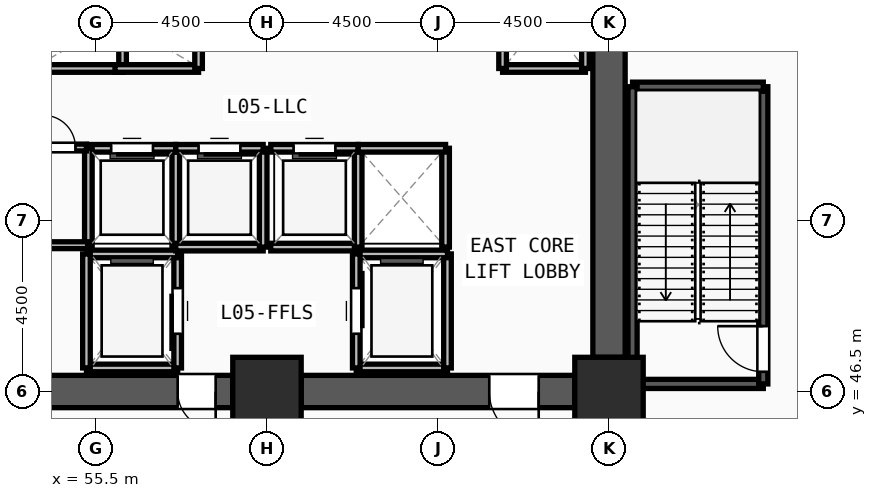
"""IFC4 building model, lengths in metres.
Left out: names, types, materials, properties, quantities, classifications, styles, units other than length and angle.
Written with IfcOpenShell. Run it as: python <this file> out.ifc"""

import sys

from ifc_helpers import new_model, si_unit, direction, frame, frame_2d, origin, origin_2d, place, context, subcontext, project, spatial, rectangle, extrude, source, transform, mapped, element, fill, save


model = new_model("IFC4")
c1 = context("Model", 3, precision=1e-05, world=origin(), true_north=direction((0.0, 1.0)))
c2 = subcontext(c1, "Body", "Model", "MODEL_VIEW")
j1 = project(units=[si_unit("LENGTHUNIT", "METRE"), si_unit("PLANEANGLEUNIT", "RADIAN")], contexts=[c1])
p1 = place(None, origin())
s1 = spatial("IfcSite", under=j1, at=p1, CompositionType="ELEMENT")
p2 = place(p1, origin())
s2 = spatial("IfcBuilding", under=s1, at=p2, CompositionType="ELEMENT")
p3 = place(p2, frame((0.0, 0.0, 18.9)))
s3 = spatial("IfcBuildingStorey", under=s2, at=p3, CompositionType="ELEMENT", Elevation=18.9)
m1 = source(origin(), c2, "Body", "SweptSolid", [
    extrude(rectangle(XDim=1.8, YDim=1.8, at=origin_2d()), origin(), (0.0, 0.0, 1.0), 4.5),
])
for number, where, z_axis, x_axis in (
    (1, (60.0, 46.5, 0.0), (0.0, 0.0, 1.0), (1.0, 0.0, 0.0)),
    (2, (69.0, 46.5, 0.0), (0.0, 0.0, 1.0), (1.0, 0.0, 0.0)),
):
    element("IfcColumn", number, at=place(p3, frame(where, z_axis=z_axis, x_axis=x_axis)), inside=s3, PredefinedType="COLUMN", context=c2, shape_type="MappedRepresentation", body=[
        mapped(m1, transform((0.0, 0.0, 0.0), x_axis=(1.0, 0.0, 0.0), y_axis=(0.0, 1.0, 0.0), z_axis=(0.0, 0.0, 1.0), scale=1.0)),
    ])
p4 = place(p3, frame((69.0, 60.6, 0.0), z_axis=(0.0, 0.0, 1.0), x_axis=(0.0, -1.0, 0.0)))
e3 = element("IfcWall", 3, at=p4, inside=s3, PredefinedType="SHEAR", context=c2, shape_type="SweptSolid", body=[
    extrude(rectangle(XDim=13.2, YDim=0.85, at=frame_2d((6.6, 0.0))), origin(), (0.0, 0.0, 1.0), 3.6),
])
m2 = source(origin(), c2, "Body", "SweptSolid", [
    extrude(rectangle(XDim=1.2, YDim=2.2, at=frame_2d((0.6, 1.1))), frame((0.0, 0.435, 0.0), z_axis=(0.0, -1.0, 0.0), x_axis=(1.0, 0.0, 0.0)), (0.0, 0.0, 1.0), 0.87),
])
p5 = place(p4, frame((1.05, 0.0, 0.0)))
e4 = element("IfcOpeningElement", 4, at=p5, cuts=e3, PredefinedType="OPENING", context=c2, shape_type="MappedRepresentation", body=[
    mapped(m2, transform((0.0, 0.0, 0.0), x_axis=(1.0, 0.0, 0.0), y_axis=(0.0, 1.0, 0.0), z_axis=(0.0, 0.0, 1.0), scale=1.0)),
])
p6 = place(p3, frame((68.1, 46.5, 0.0), z_axis=(0.0, 0.0, 1.0), x_axis=(-1.0, 0.0, 0.0)))
e5 = element("IfcWall", 5, at=p6, inside=s3, PredefinedType="SHEAR", context=c2, shape_type="SweptSolid", body=[
    extrude(rectangle(XDim=7.2, YDim=0.85, at=frame_2d((3.6, 0.0))), origin(), (0.0, 0.0, 1.0), 3.6),
])
m3 = source(origin(), c2, "Body", "SweptSolid", [
    extrude(rectangle(XDim=1.3, YDim=2.2, at=frame_2d((0.65, 1.1))), frame((0.0, 0.435, 0.0), z_axis=(0.0, -1.0, 0.0), x_axis=(1.0, 0.0, 0.0)), (0.0, 0.0, 1.0), 0.87),
])
p7 = place(p6, frame((0.95, 0.0, 0.0)))
e6 = element("IfcOpeningElement", 6, at=p7, cuts=e5, PredefinedType="OPENING", context=c2, shape_type="MappedRepresentation", body=[
    mapped(m3, transform((0.0, 0.0, 0.0), x_axis=(1.0, 0.0, 0.0), y_axis=(0.0, 1.0, 0.0), z_axis=(0.0, 0.0, 1.0), scale=1.0)),
])
p8 = place(p3, frame((59.1, 46.5, 0.0), z_axis=(0.0, 0.0, 1.0), x_axis=(-1.0, 0.0, 0.0)))
e7 = element("IfcWall", 7, at=p8, inside=s3, PredefinedType="SHEAR", context=c2, shape_type="SweptSolid", body=[
    extrude(rectangle(XDim=7.2, YDim=0.85, at=frame_2d((3.6, 0.0))), origin(), (0.0, 0.0, 1.0), 3.6),
])
p9 = place(p8, frame((4.95, 0.0, 0.0)))
e8 = element("IfcOpeningElement", 8, at=p9, cuts=e7, PredefinedType="OPENING", context=c2, shape_type="MappedRepresentation", body=[
    mapped(m3, transform((0.0, 0.0, 0.0), x_axis=(1.0, 0.0, 0.0), y_axis=(0.0, 1.0, 0.0), z_axis=(0.0, 0.0, 1.0), scale=1.0)),
])
m4 = source(origin(), c2, "Body", "SweptSolid", [
    extrude(rectangle(XDim=1.0, YDim=2.2, at=frame_2d((0.5, 1.1))), frame((0.0, 0.435, 0.0), z_axis=(0.0, -1.0, 0.0), x_axis=(1.0, 0.0, 0.0)), (0.0, 0.0, 1.0), 0.87),
])
p10 = place(p8, frame((0.45, 0.0, 0.0)))
e9 = element("IfcOpeningElement", 9, at=p10, cuts=e7, PredefinedType="OPENING", context=c2, shape_type="MappedRepresentation", body=[
    mapped(m4, transform((0.0, 0.0, 0.0), x_axis=(1.0, 0.0, 0.0), y_axis=(0.0, 1.0, 0.0), z_axis=(0.0, 0.0, 1.0), scale=1.0)),
])
p11 = place(p3, frame((69.62, 46.7, 0.0), z_axis=(0.0, 0.0, 1.0), x_axis=(1.0, 0.0, 0.0)))
e10 = element("IfcWall", 10, at=p11, inside=s3, PredefinedType="SOLIDWALL", context=c2, shape_type="SweptSolid", body=[
    extrude(rectangle(XDim=3.44, YDim=0.24, at=frame_2d((1.72, 0.0))), origin(), (0.0, 0.0, 1.0), 3.6),
])
p12 = place(p3, frame((73.06, 46.7, 0.0), z_axis=(0.0, 0.0, 1.0), x_axis=(0.0, 1.0, 0.0)))
e11 = element("IfcWall", 11, at=p12, inside=s3, PredefinedType="SOLIDWALL", context=c2, shape_type="SweptSolid", body=[
    extrude(rectangle(XDim=7.82, YDim=0.24, at=frame_2d((3.91, 0.0))), origin(), (0.0, 0.0, 1.0), 3.6),
])
m5 = source(origin(), c2, "Body", "SweptSolid", [
    extrude(rectangle(XDim=1.2, YDim=2.2, at=frame_2d((0.6, 1.1))), frame((0.0, 0.13, 0.0), z_axis=(0.0, -1.0, 0.0), x_axis=(1.0, 0.0, 0.0)), (0.0, 0.0, 1.0), 0.26),
])
p13 = place(p12, frame((0.32, 0.0, 0.0)))
e12 = element("IfcOpeningElement", 12, at=p13, cuts=e11, PredefinedType="OPENING", context=c2, shape_type="MappedRepresentation", body=[
    mapped(m5, transform((0.0, 0.0, 0.0), x_axis=(1.0, 0.0, 0.0), y_axis=(0.0, 1.0, 0.0), z_axis=(0.0, 0.0, 1.0), scale=1.0)),
])
p14 = place(p3, frame((73.06, 54.52, 0.0), z_axis=(0.0, 0.0, 1.0), x_axis=(-1.0, 0.0, 0.0)))
e13 = element("IfcWall", 13, at=p14, inside=s3, PredefinedType="SOLIDWALL", context=c2, shape_type="SweptSolid", body=[
    extrude(rectangle(XDim=3.44, YDim=0.24, at=frame_2d((1.72, 0.0))), origin(), (0.0, 0.0, 1.0), 3.6),
])
p15 = place(p3, frame((69.62, 54.52, 0.0), z_axis=(0.0, 0.0, 1.0), x_axis=(0.0, -1.0, 0.0)))
e14 = element("IfcWall", 14, at=p15, inside=s3, PredefinedType="SOLIDWALL", context=c2, shape_type="SweptSolid", body=[
    extrude(rectangle(XDim=7.82, YDim=0.24, at=frame_2d((3.91, 0.0))), origin(), (0.0, 0.0, 1.0), 3.6),
])
p16 = place(p3, frame((55.25, 47.12, 0.0), z_axis=(0.0, 0.0, 1.0), x_axis=(1.0, 0.0, 0.0)))
e15 = element("IfcWall", 15, at=p16, inside=s3, PredefinedType="SOLIDWALL", context=c2, shape_type="SweptSolid", body=[
    extrude(rectangle(XDim=2.4, YDim=0.2, at=frame_2d((1.2, 0.0))), origin(), (0.0, 0.0, 1.0), 3.6),
])
p17 = place(p3, frame((57.65, 47.12, 0.0), z_axis=(0.0, 0.0, 1.0), x_axis=(0.0, 1.0, 0.0)))
e16 = element("IfcWall", 16, at=p17, inside=s3, PredefinedType="SOLIDWALL", context=c2, shape_type="SweptSolid", body=[
    extrude(rectangle(XDim=3.0, YDim=0.2, at=frame_2d((1.5, 0.0))), origin(), (0.0, 0.0, 1.0), 3.6),
])
m6 = source(origin(), c2, "Body", "SweptSolid", [
    extrude(rectangle(XDim=1.2, YDim=2.3, at=frame_2d((0.6, 1.15))), frame((0.0, 0.11, 0.0), z_axis=(0.0, -1.0, 0.0), x_axis=(1.0, 0.0, 0.0)), (0.0, 0.0, 1.0), 0.22),
])
p18 = place(p17, frame((0.9, 0.0, 0.0)))
e17 = element("IfcOpeningElement", 17, at=p18, cuts=e16, PredefinedType="OPENING", context=c2, shape_type="MappedRepresentation", body=[
    mapped(m6, transform((0.0, 0.0, 0.0), x_axis=(1.0, 0.0, 0.0), y_axis=(0.0, 1.0, 0.0), z_axis=(0.0, 0.0, 1.0), scale=1.0)),
])
p19 = place(p3, frame((57.65, 50.12, 0.0), z_axis=(0.0, 0.0, 1.0), x_axis=(-1.0, 0.0, 0.0)))
e18 = element("IfcWall", 18, at=p19, inside=s3, PredefinedType="SOLIDWALL", context=c2, shape_type="SweptSolid", body=[
    extrude(rectangle(XDim=2.4, YDim=0.2, at=frame_2d((1.2, 0.0))), origin(), (0.0, 0.0, 1.0), 3.6),
])
p20 = place(p3, frame((55.25, 50.12, 0.0), z_axis=(0.0, 0.0, 1.0), x_axis=(0.0, -1.0, 0.0)))
e19 = element("IfcWall", 19, at=p20, inside=s3, PredefinedType="SOLIDWALL", context=c2, shape_type="SweptSolid", body=[
    extrude(rectangle(XDim=3.0, YDim=0.2, at=frame_2d((1.5, 0.0))), origin(), (0.0, 0.0, 1.0), 3.6),
])
p21 = place(p3, frame((62.35, 47.12, 0.0), z_axis=(0.0, 0.0, 1.0), x_axis=(1.0, 0.0, 0.0)))
e20 = element("IfcWall", 20, at=p21, inside=s3, PredefinedType="SOLIDWALL", context=c2, shape_type="SweptSolid", body=[
    extrude(rectangle(XDim=2.4, YDim=0.2, at=frame_2d((1.2, 0.0))), origin(), (0.0, 0.0, 1.0), 3.6),
])
p22 = place(p3, frame((64.75, 47.12, 0.0), z_axis=(0.0, 0.0, 1.0), x_axis=(0.0, 1.0, 0.0)))
e21 = element("IfcWall", 21, at=p22, inside=s3, PredefinedType="SOLIDWALL", context=c2, shape_type="SweptSolid", body=[
    extrude(rectangle(XDim=3.0, YDim=0.2, at=frame_2d((1.5, 0.0))), origin(), (0.0, 0.0, 1.0), 3.6),
])
p23 = place(p3, frame((64.75, 50.12, 0.0), z_axis=(0.0, 0.0, 1.0), x_axis=(-1.0, 0.0, 0.0)))
e22 = element("IfcWall", 22, at=p23, inside=s3, PredefinedType="SOLIDWALL", context=c2, shape_type="SweptSolid", body=[
    extrude(rectangle(XDim=2.4, YDim=0.2, at=frame_2d((1.2, 0.0))), origin(), (0.0, 0.0, 1.0), 3.6),
])
p24 = place(p3, frame((62.35, 50.12, 0.0), z_axis=(0.0, 0.0, 1.0), x_axis=(0.0, -1.0, 0.0)))
e23 = element("IfcWall", 23, at=p24, inside=s3, PredefinedType="SOLIDWALL", context=c2, shape_type="SweptSolid", body=[
    extrude(rectangle(XDim=3.0, YDim=0.2, at=frame_2d((1.5, 0.0))), origin(), (0.0, 0.0, 1.0), 3.6),
])
p25 = place(p24, frame((0.9, 0.0, 0.0)))
e24 = element("IfcOpeningElement", 24, at=p25, cuts=e23, PredefinedType="OPENING", context=c2, shape_type="MappedRepresentation", body=[
    mapped(m6, transform((0.0, 0.0, 0.0), x_axis=(1.0, 0.0, 0.0), y_axis=(0.0, 1.0, 0.0), z_axis=(0.0, 0.0, 1.0), scale=1.0)),
])
p26 = place(p3, frame((66.2, 55.0, 0.0), z_axis=(0.0, 0.0, 1.0), x_axis=(1.0, 0.0, 0.0)))
e25 = element("IfcWall", 25, at=p26, inside=s3, PredefinedType="SOLIDWALL", context=c2, shape_type="SweptSolid", body=[
    extrude(rectangle(XDim=2.18, YDim=0.2, at=frame_2d((1.09, 0.0))), origin(), (0.0, 0.0, 1.0), 3.6),
])
for number, where, z_axis, x_axis in (
    (26, (68.38, 55.0, 0.0), (0.0, 0.0, 1.0), (0.0, 1.0, 0.0)),
    (27, (66.2, 57.75, 0.0), (0.0, 0.0, 1.0), (0.0, -1.0, 0.0)),
):
    element("IfcWall", number, at=place(p3, frame(where, z_axis=z_axis, x_axis=x_axis)), inside=s3, PredefinedType="SOLIDWALL", context=c2, shape_type="SweptSolid", body=[
        extrude(rectangle(XDim=2.75, YDim=0.2, at=frame_2d((1.375, 0.0))), origin(), (0.0, 0.0, 1.0), 3.6),
    ])
p27 = place(p3, frame((57.6, 50.3, 0.0), z_axis=(0.0, 0.0, 1.0), x_axis=(0.0, 1.0, 0.0)))
e28 = element("IfcWall", 28, at=p27, inside=s3, PredefinedType="SOLIDWALL", context=c2, shape_type="SweptSolid", body=[
    extrude(rectangle(XDim=2.6, YDim=0.2, at=frame_2d((1.3, 0.0))), origin(), (0.0, 0.0, 1.0), 3.6),
])
p28 = place(p3, frame((57.6, 52.9, 0.0), z_axis=(0.0, 0.0, 1.0), x_axis=(-1.0, 0.0, 0.0)))
e29 = element("IfcWall", 29, at=p28, inside=s3, PredefinedType="SOLIDWALL", context=c2, shape_type="SweptSolid", body=[
    extrude(rectangle(XDim=2.3, YDim=0.2, at=frame_2d((1.15, 0.0))), origin(), (0.0, 0.0, 1.0), 3.6),
])
m7 = source(origin(), c2, "Body", "SweptSolid", [
    extrude(rectangle(XDim=1.1, YDim=2.2, at=frame_2d((0.55, 1.1))), frame((0.0, 0.11, 0.0), z_axis=(0.0, -1.0, 0.0), x_axis=(1.0, 0.0, 0.0)), (0.0, 0.0, 1.0), 0.22),
])
p29 = place(p28, frame((0.6, 0.0, 0.0)))
e30 = element("IfcOpeningElement", 30, at=p29, cuts=e29, PredefinedType="OPENING", context=c2, shape_type="MappedRepresentation", body=[
    mapped(m7, transform((0.0, 0.0, 0.0), x_axis=(1.0, 0.0, 0.0), y_axis=(0.0, 1.0, 0.0), z_axis=(0.0, 0.0, 1.0), scale=1.0)),
])
p30 = place(p3, frame((55.3, 52.9, 0.0), z_axis=(0.0, 0.0, 1.0), x_axis=(0.0, -1.0, 0.0)))
e31 = element("IfcWall", 31, at=p30, inside=s3, PredefinedType="SOLIDWALL", context=c2, shape_type="SweptSolid", body=[
    extrude(rectangle(XDim=2.6, YDim=0.2, at=frame_2d((1.3, 0.0))), origin(), (0.0, 0.0, 1.0), 3.6),
])
p31 = place(p3, frame((57.6, 50.3, 0.0), z_axis=(0.0, 0.0, 1.0), x_axis=(1.0, 0.0, 0.0)))
e32 = element("IfcWall", 32, at=p31, inside=s3, PredefinedType="SOLIDWALL", context=c2, shape_type="SweptSolid", body=[
    extrude(rectangle(XDim=2.3, YDim=0.2, at=frame_2d((1.15, 0.0))), origin(), (0.0, 0.0, 1.0), 3.6),
])
p32 = place(p3, frame((59.9, 50.3, 0.0), z_axis=(0.0, 0.0, 1.0), x_axis=(0.0, 1.0, 0.0)))
e33 = element("IfcWall", 33, at=p32, inside=s3, PredefinedType="SOLIDWALL", context=c2, shape_type="SweptSolid", body=[
    extrude(rectangle(XDim=2.6, YDim=0.2, at=frame_2d((1.3, 0.0))), origin(), (0.0, 0.0, 1.0), 3.6),
])
p33 = place(p3, frame((59.9, 52.9, 0.0), z_axis=(0.0, 0.0, 1.0), x_axis=(-1.0, 0.0, 0.0)))
e34 = element("IfcWall", 34, at=p33, inside=s3, PredefinedType="SOLIDWALL", context=c2, shape_type="SweptSolid", body=[
    extrude(rectangle(XDim=2.3, YDim=0.2, at=frame_2d((1.15, 0.0))), origin(), (0.0, 0.0, 1.0), 3.6),
])
p34 = place(p33, frame((0.6, 0.0, 0.0)))
e35 = element("IfcOpeningElement", 35, at=p34, cuts=e34, PredefinedType="OPENING", context=c2, shape_type="MappedRepresentation", body=[
    mapped(m7, transform((0.0, 0.0, 0.0), x_axis=(1.0, 0.0, 0.0), y_axis=(0.0, 1.0, 0.0), z_axis=(0.0, 0.0, 1.0), scale=1.0)),
])
p35 = place(p3, frame((60.1, 50.3, 0.0), z_axis=(0.0, 0.0, 1.0), x_axis=(1.0, 0.0, 0.0)))
e36 = element("IfcWall", 36, at=p35, inside=s3, PredefinedType="SOLIDWALL", context=c2, shape_type="SweptSolid", body=[
    extrude(rectangle(XDim=2.3, YDim=0.2, at=frame_2d((1.15, 0.0))), origin(), (0.0, 0.0, 1.0), 3.6),
])
p36 = place(p3, frame((62.4, 50.3, 0.0), z_axis=(0.0, 0.0, 1.0), x_axis=(0.0, 1.0, 0.0)))
e37 = element("IfcWall", 37, at=p36, inside=s3, PredefinedType="SOLIDWALL", context=c2, shape_type="SweptSolid", body=[
    extrude(rectangle(XDim=2.6, YDim=0.2, at=frame_2d((1.3, 0.0))), origin(), (0.0, 0.0, 1.0), 3.6),
])
p37 = place(p3, frame((62.4, 52.9, 0.0), z_axis=(0.0, 0.0, 1.0), x_axis=(-1.0, 0.0, 0.0)))
e38 = element("IfcWall", 38, at=p37, inside=s3, PredefinedType="SOLIDWALL", context=c2, shape_type="SweptSolid", body=[
    extrude(rectangle(XDim=2.3, YDim=0.2, at=frame_2d((1.15, 0.0))), origin(), (0.0, 0.0, 1.0), 3.6),
])
p38 = place(p37, frame((0.6, 0.0, 0.0)))
e39 = element("IfcOpeningElement", 39, at=p38, cuts=e38, PredefinedType="OPENING", context=c2, shape_type="MappedRepresentation", body=[
    mapped(m7, transform((0.0, 0.0, 0.0), x_axis=(1.0, 0.0, 0.0), y_axis=(0.0, 1.0, 0.0), z_axis=(0.0, 0.0, 1.0), scale=1.0)),
])
p39 = place(p3, frame((64.7, 50.3, 0.0), z_axis=(0.0, 0.0, 1.0), x_axis=(0.0, 1.0, 0.0)))
e40 = element("IfcWall", 40, at=p39, inside=s3, PredefinedType="SOLIDWALL", context=c2, shape_type="SweptSolid", body=[
    extrude(rectangle(XDim=2.6, YDim=0.2, at=frame_2d((1.3, 0.0))), origin(), (0.0, 0.0, 1.0), 3.6),
])
for number, where, z_axis, x_axis in (
    (41, (64.7, 52.9, 0.0), (0.0, 0.0, 1.0), (-1.0, 0.0, 0.0)),
    (42, (53.9, 55.0, 0.0), (0.0, 0.0, 1.0), (1.0, 0.0, 0.0)),
):
    element("IfcWall", number, at=place(p3, frame(where, z_axis=z_axis, x_axis=x_axis)), inside=s3, PredefinedType="SOLIDWALL", context=c2, shape_type="SweptSolid", body=[
        extrude(rectangle(XDim=2.3, YDim=0.2, at=frame_2d((1.15, 0.0))), origin(), (0.0, 0.0, 1.0), 3.6),
    ])
p40 = place(p3, frame((56.2, 55.0, 0.0), z_axis=(0.0, 0.0, 1.0), x_axis=(0.0, 1.0, 0.0)))
e43 = element("IfcWall", 43, at=p40, inside=s3, PredefinedType="SOLIDWALL", context=c2, shape_type="SweptSolid", body=[
    extrude(rectangle(XDim=2.6, YDim=0.2, at=frame_2d((1.3, 0.0))), origin(), (0.0, 0.0, 1.0), 3.6),
])
p41 = place(p3, frame((56.0, 55.0, 0.0), z_axis=(0.0, 0.0, 1.0), x_axis=(1.0, 0.0, 0.0)))
e44 = element("IfcWall", 44, at=p41, inside=s3, PredefinedType="SOLIDWALL", context=c2, shape_type="SweptSolid", body=[
    extrude(rectangle(XDim=2.2, YDim=0.2, at=frame_2d((1.1, 0.0))), origin(), (0.0, 0.0, 1.0), 3.6),
])
p42 = place(p3, frame((58.2, 55.0, 0.0), z_axis=(0.0, 0.0, 1.0), x_axis=(0.0, 1.0, 0.0)))
e45 = element("IfcWall", 45, at=p42, inside=s3, PredefinedType="SOLIDWALL", context=c2, shape_type="SweptSolid", body=[
    extrude(rectangle(XDim=2.6, YDim=0.2, at=frame_2d((1.3, 0.0))), origin(), (0.0, 0.0, 1.0), 3.6),
])
p43 = place(p3, frame((53.82, 52.92, 0.0), z_axis=(0.0, 0.0, 1.0), x_axis=(1.0, 0.0, 0.0)))
e46 = element("IfcWall", 46, at=p43, inside=s3, PredefinedType="PARTITIONING", context=c2, shape_type="SweptSolid", body=[
    extrude(rectangle(XDim=1.43, YDim=0.18, at=frame_2d((0.715, 0.0))), origin(), (0.0, 0.0, 1.0), 3.6),
])
m8 = source(origin(), c2, "Body", "SweptSolid", [
    extrude(rectangle(XDim=0.85, YDim=2.1, at=frame_2d((0.425, 1.05))), frame((0.0, 0.1, 0.0), z_axis=(0.0, -1.0, 0.0), x_axis=(1.0, 0.0, 0.0)), (0.0, 0.0, 1.0), 0.2),
])
p44 = place(p43, frame((0.29, 0.0, 0.0)))
e47 = element("IfcOpeningElement", 47, at=p44, cuts=e46, PredefinedType="OPENING", context=c2, shape_type="MappedRepresentation", body=[
    mapped(m8, transform((0.0, 0.0, 0.0), x_axis=(1.0, 0.0, 0.0), y_axis=(0.0, 1.0, 0.0), z_axis=(0.0, 0.0, 1.0), scale=1.0)),
])
p45 = place(p3, frame((53.79, 50.35, 0.0), z_axis=(0.0, 0.0, 1.0), x_axis=(1.0, 0.0, 0.0)))
e48 = element("IfcWall", 48, at=p45, inside=s3, PredefinedType="PARTITIONING", context=c2, shape_type="SweptSolid", body=[
    extrude(rectangle(XDim=1.49, YDim=0.18, at=frame_2d((0.745, 0.0))), origin(), (0.0, 0.0, 1.0), 3.6),
])
m9 = source(origin(), c2, "Body", "SweptSolid", [
    extrude(rectangle(XDim=1.0, YDim=2.2, at=frame_2d((0.5, 1.1))), frame((0.0, 0.025, 0.0), z_axis=(0.0, -1.0, 0.0), x_axis=(1.0, 0.0, 0.0)), (0.0, 0.0, 1.0), 0.05),
])
p46 = place(p10, origin())
e49 = element("IfcDoor", 49, at=p46, inside=s3, OperationType="SINGLE_SWING_LEFT", PredefinedType="DOOR", context=c2, shape_type="MappedRepresentation", body=[
    mapped(m9, transform((0.0, 0.0, 0.0), x_axis=(1.0, 0.0, 0.0), y_axis=(0.0, 1.0, 0.0), z_axis=(0.0, 0.0, 1.0), scale=1.0)),
])
fill(e9, e49)
m10 = source(origin(), c2, "Body", "SweptSolid", [
    extrude(rectangle(XDim=1.3, YDim=2.2, at=frame_2d((0.65, 1.1))), frame((0.0, 0.025, 0.0), z_axis=(0.0, -1.0, 0.0), x_axis=(1.0, 0.0, 0.0)), (0.0, 0.0, 1.0), 0.05),
])
p47 = place(p7, origin())
e50 = element("IfcDoor", 50, at=p47, inside=s3, OperationType="SINGLE_SWING_LEFT", PredefinedType="DOOR", context=c2, shape_type="MappedRepresentation", body=[
    mapped(m10, transform((0.0, 0.0, 0.0), x_axis=(1.0, 0.0, 0.0), y_axis=(0.0, 1.0, 0.0), z_axis=(0.0, 0.0, 1.0), scale=1.0)),
])
fill(e6, e50)
m11 = source(origin(), c2, "Body", "SweptSolid", [
    extrude(rectangle(XDim=1.2, YDim=2.2, at=frame_2d((0.6, 1.1))), frame((0.0, 0.025, 0.0), z_axis=(0.0, -1.0, 0.0), x_axis=(1.0, 0.0, 0.0)), (0.0, 0.0, 1.0), 0.05),
])
p48 = place(p13, origin())
e51 = element("IfcDoor", 51, at=p48, inside=s3, OperationType="SINGLE_SWING_RIGHT", PredefinedType="DOOR", context=c2, shape_type="MappedRepresentation", body=[
    mapped(m11, transform((0.0, 0.0, 0.0), x_axis=(1.0, 0.0, 0.0), y_axis=(0.0, 1.0, 0.0), z_axis=(0.0, 0.0, 1.0), scale=1.0)),
])
fill(e12, e51)
m12 = source(origin(), c2, "Body", "SweptSolid", [
    extrude(rectangle(XDim=1.2, YDim=2.3, at=frame_2d((0.6, 1.15))), frame((0.0, 0.025, 0.0), z_axis=(0.0, -1.0, 0.0), x_axis=(1.0, 0.0, 0.0)), (0.0, 0.0, 1.0), 0.05),
])
p49 = place(p18, origin())
e52 = element("IfcDoor", 52, at=p49, inside=s3, OperationType="SLIDING_TO_LEFT", PredefinedType="DOOR", context=c2, shape_type="MappedRepresentation", body=[
    mapped(m12, transform((0.0, 0.0, 0.0), x_axis=(1.0, 0.0, 0.0), y_axis=(0.0, 1.0, 0.0), z_axis=(0.0, 0.0, 1.0), scale=1.0)),
])
fill(e17, e52)
p50 = place(p25, origin())
e53 = element("IfcDoor", 53, at=p50, inside=s3, OperationType="SLIDING_TO_LEFT", PredefinedType="DOOR", context=c2, shape_type="MappedRepresentation", body=[
    mapped(m12, transform((0.0, 0.0, 0.0), x_axis=(1.0, 0.0, 0.0), y_axis=(0.0, 1.0, 0.0), z_axis=(0.0, 0.0, 1.0), scale=1.0)),
])
fill(e24, e53)
m13 = source(origin(), c2, "Body", "SweptSolid", [
    extrude(rectangle(XDim=1.1, YDim=2.2, at=frame_2d((0.55, 1.1))), frame((0.0, 0.025, 0.0), z_axis=(0.0, -1.0, 0.0), x_axis=(1.0, 0.0, 0.0)), (0.0, 0.0, 1.0), 0.05),
])
p51 = place(p29, origin())
e54 = element("IfcDoor", 54, at=p51, inside=s3, OperationType="SLIDING_TO_LEFT", PredefinedType="DOOR", context=c2, shape_type="MappedRepresentation", body=[
    mapped(m13, transform((0.0, 0.0, 0.0), x_axis=(1.0, 0.0, 0.0), y_axis=(0.0, 1.0, 0.0), z_axis=(0.0, 0.0, 1.0), scale=1.0)),
])
fill(e30, e54)
p52 = place(p34, origin())
e55 = element("IfcDoor", 55, at=p52, inside=s3, OperationType="SLIDING_TO_LEFT", PredefinedType="DOOR", context=c2, shape_type="MappedRepresentation", body=[
    mapped(m13, transform((0.0, 0.0, 0.0), x_axis=(1.0, 0.0, 0.0), y_axis=(0.0, 1.0, 0.0), z_axis=(0.0, 0.0, 1.0), scale=1.0)),
])
fill(e35, e55)
p53 = place(p38, origin())
e56 = element("IfcDoor", 56, at=p53, inside=s3, OperationType="SLIDING_TO_LEFT", PredefinedType="DOOR", context=c2, shape_type="MappedRepresentation", body=[
    mapped(m13, transform((0.0, 0.0, 0.0), x_axis=(1.0, 0.0, 0.0), y_axis=(0.0, 1.0, 0.0), z_axis=(0.0, 0.0, 1.0), scale=1.0)),
])
fill(e39, e56)
m14 = source(origin(), c2, "Body", "SweptSolid", [
    extrude(rectangle(XDim=0.85, YDim=2.1, at=frame_2d((0.425, 1.05))), frame((0.0, 0.025, 0.0), z_axis=(0.0, -1.0, 0.0), x_axis=(1.0, 0.0, 0.0)), (0.0, 0.0, 1.0), 0.05),
])
p54 = place(p44, origin())
e57 = element("IfcDoor", 57, at=p54, inside=s3, OperationType="SINGLE_SWING_LEFT", PredefinedType="DOOR", context=c2, shape_type="MappedRepresentation", body=[
    mapped(m14, transform((0.0, 0.0, 0.0), x_axis=(1.0, 0.0, 0.0), y_axis=(0.0, 1.0, 0.0), z_axis=(0.0, 0.0, 1.0), scale=1.0)),
])
fill(e47, e57)
save(model, sys.argv[1])
